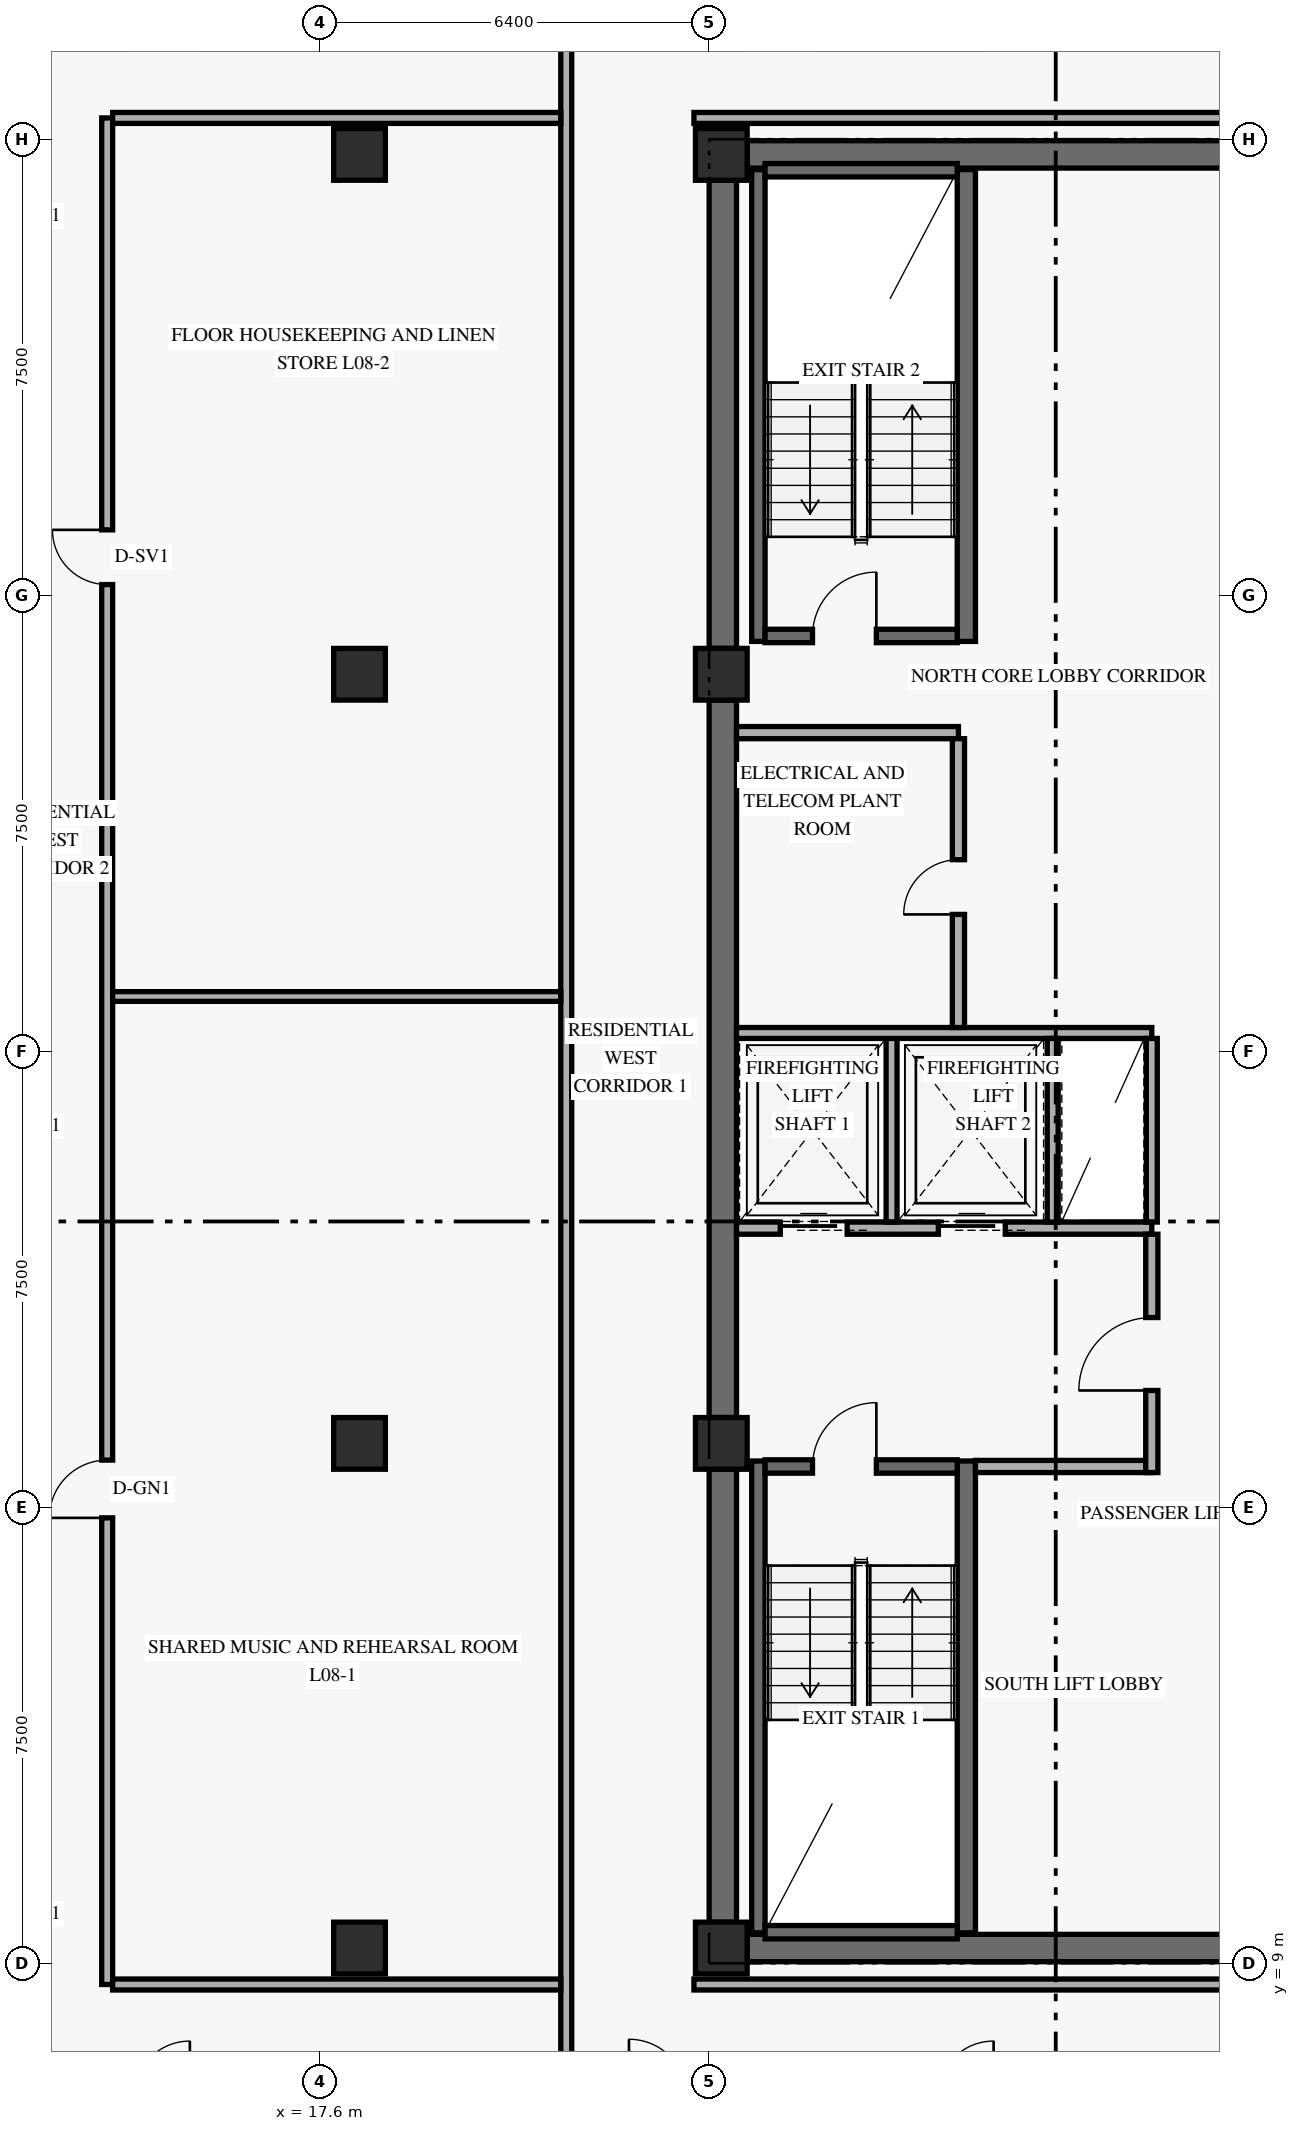
"""IFC4 building model, lengths in metres.
Left out: names, types, materials, properties, quantities, classifications, styles, units other than length and angle.
Written with IfcOpenShell. Run it as: python <this file> out.ifc"""

import sys

from ifc_helpers import new_model, si_unit, direction, frame, frame_2d, origin, origin_2d, place, context, subcontext, project, spatial, rectangle, extrude, element, fill, save


model = new_model("IFC4")
c1 = context("Model", 3, precision=1e-05, world=origin(), true_north=direction((0.0, 1.0)))
c2 = subcontext(c1, "Body", "Model", "MODEL_VIEW")
j1 = project(units=[si_unit("LENGTHUNIT", "METRE"), si_unit("PLANEANGLEUNIT", "RADIAN")], contexts=[c1])
p1 = place(None, origin())
s1 = spatial("IfcSite", under=j1, at=p1, CompositionType="ELEMENT")
p2 = place(p1, origin())
s2 = spatial("IfcBuilding", under=s1, at=p2, CompositionType="ELEMENT")
p3 = place(p2, frame((0.0, 0.0, 34.8)))
s3 = spatial("IfcBuildingStorey", under=s2, at=p3, CompositionType="ELEMENT", Elevation=34.8)
p4 = place(p3, frame((24.225, 9.675, 0.0), z_axis=(0.0, 0.0, 1.0), x_axis=(0.0, 1.0, 0.0)))
e1 = element("IfcWall", 1, at=p4, inside=s3, PredefinedType="SHEAR", context=c2, shape_type="SweptSolid", body=[
    extrude(rectangle(XDim=7.45, YDim=0.45, at=frame_2d((3.725, 0.0))), origin(), (0.0, 0.0, 1.0), 2.667),
])
p5 = place(p3, frame((24.225, 17.975, 0.0), z_axis=(0.0, 0.0, 1.0), x_axis=(0.0, 1.0, 0.0)))
e2 = element("IfcWall", 2, at=p5, inside=s3, PredefinedType="SHEAR", context=c2, shape_type="SweptSolid", body=[
    extrude(rectangle(XDim=11.8, YDim=0.45, at=frame_2d((5.9, 0.0))), origin(), (0.0, 0.0, 1.0), 2.667),
])
p6 = place(p3, frame((24.225, 30.625, 0.0), z_axis=(0.0, 0.0, 1.0), x_axis=(0.0, 1.0, 0.0)))
e3 = element("IfcWall", 3, at=p6, inside=s3, PredefinedType="SHEAR", context=c2, shape_type="SweptSolid", body=[
    extrude(rectangle(XDim=7.7, YDim=0.45, at=frame_2d((3.85, 0.0))), origin(), (0.0, 0.0, 1.0), 2.667),
])
for number, where, z_axis, x_axis in (
    (4, (24.625, 9.25, 0.0), (0.0, 0.0, 1.0), (1.0, 0.0, 0.0)),
    (5, (24.625, 38.75, 0.0), (0.0, 0.0, 1.0), (1.0, 0.0, 0.0)),
):
    element("IfcWall", number, at=place(p3, frame(where, z_axis=z_axis, x_axis=x_axis)), inside=s3, PredefinedType="SHEAR", context=c2, shape_type="SweptSolid", body=[
        extrude(rectangle(XDim=10.15, YDim=0.45, at=frame_2d((5.075, 0.0))), origin(), (0.0, 0.0, 1.0), 3.36),
    ])
p7 = place(p3, frame((24.81, 9.5, 0.0), z_axis=(0.0, 0.0, 1.0), x_axis=(0.0, 1.0, 0.0)))
e6 = element("IfcWall", 6, at=p7, inside=s3, PredefinedType="SHEAR", context=c2, shape_type="SweptSolid", body=[
    extrude(rectangle(XDim=7.76, YDim=0.22, at=frame_2d((3.88, 0.0))), origin(), (0.0, 0.0, 1.0), 3.36),
])
p8 = place(p3, frame((28.23, 9.5, 0.0), z_axis=(0.0, 0.0, 1.0), x_axis=(0.0, 1.0, 0.0)))
e7 = element("IfcWall", 7, at=p8, inside=s3, PredefinedType="SHEAR", context=c2, shape_type="SweptSolid", body=[
    extrude(rectangle(XDim=7.76, YDim=0.3, at=frame_2d((3.88, 0.0))), origin(), (0.0, 0.0, 1.0), 3.36),
])
p9 = place(p3, frame((24.92, 9.51, 0.0), z_axis=(0.0, 0.0, 1.0), x_axis=(1.0, 0.0, 0.0)))
e8 = element("IfcWall", 8, at=p9, inside=s3, PredefinedType="SHEAR", context=c2, shape_type="SweptSolid", body=[
    extrude(rectangle(XDim=3.16, YDim=0.22, at=frame_2d((1.58, 0.0))), origin(), (0.0, 0.0, 1.0), 3.36),
])
p10 = place(p3, frame((24.92, 17.17, 0.0), z_axis=(0.0, 0.0, 1.0), x_axis=(1.0, 0.0, 0.0)))
e9 = element("IfcWall", 9, at=p10, inside=s3, PredefinedType="SHEAR", context=c2, shape_type="SweptSolid", body=[
    extrude(rectangle(XDim=3.16, YDim=0.22, at=frame_2d((1.58, 0.0))), origin(), (0.0, 0.0, 1.0), 3.36),
])
p11 = place(p10, frame((0.78, 0.0, 0.0)))
e10 = element("IfcOpeningElement", 10, at=p11, cuts=e9, PredefinedType="OPENING", context=c2, shape_type="SweptSolid", body=[
    extrude(rectangle(XDim=1.05, YDim=2.15, at=frame_2d((0.525, 1.075))), frame((0.0, 0.12, 0.0), z_axis=(0.0, -1.0, 0.0), x_axis=(1.0, 0.0, 0.0)), (0.0, 0.0, 1.0), 0.24),
])
p12 = place(p3, frame((24.81, 30.74, 0.0), z_axis=(0.0, 0.0, 1.0), x_axis=(0.0, 1.0, 0.0)))
e11 = element("IfcWall", 11, at=p12, inside=s3, PredefinedType="SHEAR", context=c2, shape_type="SweptSolid", body=[
    extrude(rectangle(XDim=7.76, YDim=0.22, at=frame_2d((3.88, 0.0))), origin(), (0.0, 0.0, 1.0), 3.36),
])
p13 = place(p3, frame((28.23, 30.74, 0.0), z_axis=(0.0, 0.0, 1.0), x_axis=(0.0, 1.0, 0.0)))
e12 = element("IfcWall", 12, at=p13, inside=s3, PredefinedType="SHEAR", context=c2, shape_type="SweptSolid", body=[
    extrude(rectangle(XDim=7.76, YDim=0.3, at=frame_2d((3.88, 0.0))), origin(), (0.0, 0.0, 1.0), 3.36),
])
p14 = place(p3, frame((24.92, 30.83, 0.0), z_axis=(0.0, 0.0, 1.0), x_axis=(1.0, 0.0, 0.0)))
e13 = element("IfcWall", 13, at=p14, inside=s3, PredefinedType="SHEAR", context=c2, shape_type="SweptSolid", body=[
    extrude(rectangle(XDim=3.16, YDim=0.22, at=frame_2d((1.58, 0.0))), origin(), (0.0, 0.0, 1.0), 3.36),
])
p15 = place(p14, frame((0.78, 0.0, 0.0)))
e14 = element("IfcOpeningElement", 14, at=p15, cuts=e13, PredefinedType="OPENING", context=c2, shape_type="SweptSolid", body=[
    extrude(rectangle(XDim=1.05, YDim=2.15, at=frame_2d((0.525, 1.075))), frame((0.0, 0.12, 0.0), z_axis=(0.0, -1.0, 0.0), x_axis=(1.0, 0.0, 0.0)), (0.0, 0.0, 1.0), 0.24),
])
p16 = place(p3, frame((24.92, 38.49, 0.0), z_axis=(0.0, 0.0, 1.0), x_axis=(1.0, 0.0, 0.0)))
e15 = element("IfcWall", 15, at=p16, inside=s3, PredefinedType="SHEAR", context=c2, shape_type="SweptSolid", body=[
    extrude(rectangle(XDim=3.16, YDim=0.22, at=frame_2d((1.58, 0.0))), origin(), (0.0, 0.0, 1.0), 3.36),
])
for number, where, z_axis, x_axis in (
    (16, (18.25, 9.25, 0.0), (0.0, 0.0, 1.0), (1.0, 0.0, 0.0)),
    (17, (18.25, 17.55, 0.0), (0.0, 0.0, 1.0), (1.0, 0.0, 0.0)),
    (18, (18.25, 30.2, 0.0), (0.0, 0.0, 1.0), (1.0, 0.0, 0.0)),
    (19, (18.25, 38.75, 0.0), (0.0, 0.0, 1.0), (1.0, 0.0, 0.0)),
    (20, (24.2, 9.25, 0.0), (0.0, 0.0, 1.0), (1.0, 0.0, 0.0)),
    (21, (24.2, 17.55, 0.0), (0.0, 0.0, 1.0), (1.0, 0.0, 0.0)),
    (22, (24.2, 30.2, 0.0), (0.0, 0.0, 1.0), (1.0, 0.0, 0.0)),
    (23, (24.2, 38.75, 0.0), (0.0, 0.0, 1.0), (1.0, 0.0, 0.0)),
):
    element("IfcColumn", number, at=place(p3, frame(where, z_axis=z_axis, x_axis=x_axis)), inside=s3, PredefinedType="COLUMN", context=c2, shape_type="SweptSolid", body=[
        extrude(rectangle(XDim=0.85, YDim=0.85, at=origin_2d()), origin(), (0.0, 0.0, 1.0), 3.6),
    ])
p17 = place(p3, frame((24.45, 21.09, 0.0), z_axis=(0.0, 0.0, 1.0), x_axis=(1.0, 0.0, 0.0)))
e24 = element("IfcWall", 24, at=p17, inside=s3, PredefinedType="STANDARD", context=c2, shape_type="SweptSolid", body=[
    extrude(rectangle(XDim=6.83, YDim=0.2, at=frame_2d((3.415, 0.0))), origin(), (0.0, 0.0, 1.0), 3.36),
])
p18 = place(p17, frame((0.72, 0.0, 0.0)))
e25 = element("IfcOpeningElement", 25, at=p18, cuts=e24, PredefinedType="OPENING", context=c2, shape_type="SweptSolid", body=[
    extrude(rectangle(XDim=1.1, YDim=2.2, at=frame_2d((0.55, 1.1))), frame((0.0, 0.11, 0.0), z_axis=(0.0, -1.0, 0.0), x_axis=(1.0, 0.0, 0.0)), (0.0, 0.0, 1.0), 0.22),
])
p19 = place(p17, frame((3.32, 0.0, 0.0)))
e26 = element("IfcOpeningElement", 26, at=p19, cuts=e24, PredefinedType="OPENING", context=c2, shape_type="SweptSolid", body=[
    extrude(rectangle(XDim=1.1, YDim=2.2, at=frame_2d((0.55, 1.1))), frame((0.0, 0.11, 0.0), z_axis=(0.0, -1.0, 0.0), x_axis=(1.0, 0.0, 0.0)), (0.0, 0.0, 1.0), 0.22),
])
p20 = place(p3, frame((28.38, 17.17, 0.0), z_axis=(0.0, 0.0, 1.0), x_axis=(1.0, 0.0, 0.0)))
e27 = element("IfcWall", 27, at=p20, inside=s3, PredefinedType="STANDARD", context=c2, shape_type="SweptSolid", body=[
    extrude(rectangle(XDim=2.9, YDim=0.2, at=frame_2d((1.45, 0.0))), origin(), (0.0, 0.0, 1.0), 3.36),
])
p21 = place(p3, frame((31.28, 17.07, 0.0), z_axis=(0.0, 0.0, 1.0), x_axis=(0.0, 1.0, 0.0)))
e28 = element("IfcWall", 28, at=p21, inside=s3, PredefinedType="STANDARD", context=c2, shape_type="SweptSolid", body=[
    extrude(rectangle(XDim=3.92, YDim=0.2, at=frame_2d((1.96, 0.0))), origin(), (0.0, 0.0, 1.0), 2.649),
])
p22 = place(p21, frame((1.35, 0.0, 0.0)))
e29 = element("IfcOpeningElement", 29, at=p22, cuts=e28, PredefinedType="OPENING", context=c2, shape_type="SweptSolid", body=[
    extrude(rectangle(XDim=1.2, YDim=2.15, at=frame_2d((0.6, 1.075))), frame((0.0, 0.11, 0.0), z_axis=(0.0, -1.0, 0.0), x_axis=(1.0, 0.0, 0.0)), (0.0, 0.0, 1.0), 0.22),
])
p23 = place(p3, frame((27.0, 21.19, 0.0), z_axis=(0.0, 0.0, 1.0), x_axis=(0.0, 1.0, 0.0)))
e30 = element("IfcWall", 30, at=p23, inside=s3, PredefinedType="STANDARD", context=c2, shape_type="SweptSolid", body=[
    extrude(rectangle(XDim=3.11, YDim=0.18, at=frame_2d((1.555, 0.0))), origin(), (0.0, 0.0, 1.0), 3.36),
])
p24 = place(p3, frame((24.45, 24.3, 0.0), z_axis=(0.0, 0.0, 1.0), x_axis=(1.0, 0.0, 0.0)))
e31 = element("IfcWall", 31, at=p24, inside=s3, PredefinedType="STANDARD", context=c2, shape_type="SweptSolid", body=[
    extrude(rectangle(XDim=6.83, YDim=0.18, at=frame_2d((3.415, 0.0))), origin(), (0.0, 0.0, 1.0), 3.36),
])
for number, where, z_axis, x_axis in (
    (32, (29.65, 21.19, 0.0), (0.0, 0.0, 1.0), (0.0, 1.0, 0.0)),
    (33, (31.28, 21.19, 0.0), (0.0, 0.0, 1.0), (0.0, 1.0, 0.0)),
):
    element("IfcWall", number, at=place(p3, frame(where, z_axis=z_axis, x_axis=x_axis)), inside=s3, PredefinedType="STANDARD", context=c2, shape_type="SweptSolid", body=[
        extrude(rectangle(XDim=3.02, YDim=0.18, at=frame_2d((1.51, 0.0))), origin(), (0.0, 0.0, 1.0), 3.36),
    ])
p25 = place(p3, frame((24.45, 29.24, 0.0), z_axis=(0.0, 0.0, 1.0), x_axis=(1.0, 0.0, 0.0)))
e34 = element("IfcWall", 34, at=p25, inside=s3, PredefinedType="STANDARD", context=c2, shape_type="SweptSolid", body=[
    extrude(rectangle(XDim=3.65, YDim=0.2, at=frame_2d((1.825, 0.0))), origin(), (0.0, 0.0, 1.0), 3.36),
])
p26 = place(p3, frame((28.1, 24.39, 0.0), z_axis=(0.0, 0.0, 1.0), x_axis=(0.0, 1.0, 0.0)))
e35 = element("IfcWall", 35, at=p26, inside=s3, PredefinedType="STANDARD", context=c2, shape_type="SweptSolid", body=[
    extrude(rectangle(XDim=4.75, YDim=0.2, at=frame_2d((2.375, 0.0))), origin(), (0.0, 0.0, 1.0), 3.36),
])
p27 = place(p26, frame((1.86, 0.0, 0.0)))
e36 = element("IfcOpeningElement", 36, at=p27, cuts=e35, PredefinedType="OPENING", context=c2, shape_type="SweptSolid", body=[
    extrude(rectangle(XDim=0.9, YDim=2.1, at=frame_2d((0.45, 1.05))), frame((0.0, 0.11, 0.0), z_axis=(0.0, -1.0, 0.0), x_axis=(1.0, 0.0, 0.0)), (0.0, 0.0, 1.0), 0.22),
])
p28 = place(p3, frame((21.65, 6.8, 0.0), z_axis=(0.0, 0.0, 1.0), x_axis=(0.0, 1.0, 0.0)))
e37 = element("IfcWall", 37, at=p28, inside=s3, PredefinedType="STANDARD", context=c2, shape_type="SweptSolid", body=[
    extrude(rectangle(XDim=34.4, YDim=0.18, at=frame_2d((17.2, 0.0))), origin(), (0.0, 0.0, 1.0), 2.649),
])
for number, where, z_axis, x_axis in (
    (38, (23.75, 8.65, 0.0), (0.0, 0.0, 1.0), (1.0, 0.0, 0.0)),
    (39, (23.75, 39.35, 0.0), (0.0, 0.0, 1.0), (1.0, 0.0, 0.0)),
):
    element("IfcWall", number, at=place(p3, frame(where, z_axis=z_axis, x_axis=x_axis)), inside=s3, PredefinedType="STANDARD", context=c2, shape_type="SweptSolid", body=[
        extrude(rectangle(XDim=11.67, YDim=0.18, at=frame_2d((5.835, 0.0))), origin(), (0.0, 0.0, 1.0), 2.649),
    ])
p29 = place(p3, frame((14.1, 8.65, 0.0), z_axis=(0.0, 0.0, 1.0), x_axis=(0.0, 1.0, 0.0)))
e40 = element("IfcWall", 40, at=p29, inside=s3, PredefinedType="STANDARD", context=c2, shape_type="SweptSolid", body=[
    extrude(rectangle(XDim=30.7, YDim=0.18, at=frame_2d((15.35, 0.0))), origin(), (0.0, 0.0, 1.0), 2.649),
])
p30 = place(p29, frame((7.675, 0.0, 0.0)))
e41 = element("IfcOpeningElement", 41, at=p30, cuts=e40, PredefinedType="OPENING", context=c2, shape_type="SweptSolid", body=[
    extrude(rectangle(XDim=0.95, YDim=2.15, at=frame_2d((0.475, 1.075))), frame((0.0, 0.1, 0.0), z_axis=(0.0, -1.0, 0.0), x_axis=(1.0, 0.0, 0.0)), (0.0, 0.0, 1.0), 0.2),
])
p31 = place(p29, frame((23.025, 0.0, 0.0)))
e42 = element("IfcOpeningElement", 42, at=p31, cuts=e40, PredefinedType="OPENING", context=c2, shape_type="SweptSolid", body=[
    extrude(rectangle(XDim=0.9, YDim=2.1, at=frame_2d((0.45, 1.05))), frame((0.0, 0.1, 0.0), z_axis=(0.0, -1.0, 0.0), x_axis=(1.0, 0.0, 0.0)), (0.0, 0.0, 1.0), 0.2),
])
for number, where, z_axis, x_axis in (
    (43, (14.19, 8.65, 0.0), (0.0, 0.0, 1.0), (1.0, 0.0, 0.0)),
    (44, (14.19, 39.35, 0.0), (0.0, 0.0, 1.0), (1.0, 0.0, 0.0)),
):
    element("IfcWall", number, at=place(p3, frame(where, z_axis=z_axis, x_axis=x_axis)), inside=s3, PredefinedType="STANDARD", context=c2, shape_type="SweptSolid", body=[
        extrude(rectangle(XDim=7.37, YDim=0.18, at=frame_2d((3.685, 0.0))), origin(), (0.0, 0.0, 1.0), 2.649),
    ])
p32 = place(p3, frame((14.19, 24.9, 0.0), z_axis=(0.0, 0.0, 1.0), x_axis=(1.0, 0.0, 0.0)))
e45 = element("IfcWall", 45, at=p32, inside=s3, PredefinedType="PARTITIONING", context=c2, shape_type="SweptSolid", body=[
    extrude(rectangle(XDim=7.37, YDim=0.16, at=frame_2d((3.685, 0.0))), origin(), (0.0, 0.0, 1.0), 2.649),
])
p33 = place(p11, frame((1.05, 0.0, 0.0), z_axis=(0.0, 0.0, 1.0), x_axis=(-1.0, 0.0, 0.0)))
e46 = element("IfcDoor", 46, at=p33, inside=s3, OperationType="SINGLE_SWING_LEFT", PredefinedType="DOOR", context=c2, shape_type="SweptSolid", body=[
    extrude(rectangle(XDim=1.05, YDim=2.15, at=frame_2d((0.525, 1.075))), frame((0.0, 0.025, 0.0), z_axis=(0.0, -1.0, 0.0), x_axis=(1.0, 0.0, 0.0)), (0.0, 0.0, 1.0), 0.05),
])
fill(e10, e46)
p34 = place(p15, origin())
e47 = element("IfcDoor", 47, at=p34, inside=s3, OperationType="SINGLE_SWING_RIGHT", PredefinedType="DOOR", context=c2, shape_type="SweptSolid", body=[
    extrude(rectangle(XDim=1.05, YDim=2.15, at=frame_2d((0.525, 1.075))), frame((0.0, 0.025, 0.0), z_axis=(0.0, -1.0, 0.0), x_axis=(1.0, 0.0, 0.0)), (0.0, 0.0, 1.0), 0.05),
])
fill(e14, e47)
p35 = place(p18, origin())
e48 = element("IfcDoor", 48, at=p35, inside=s3, OperationType="SLIDING_TO_LEFT", PredefinedType="DOOR", context=c2, shape_type="SweptSolid", body=[
    extrude(rectangle(XDim=1.1, YDim=2.2, at=frame_2d((0.55, 1.1))), frame((0.0, 0.025, 0.0), z_axis=(0.0, -1.0, 0.0), x_axis=(1.0, 0.0, 0.0)), (0.0, 0.0, 1.0), 0.05),
])
fill(e25, e48)
p36 = place(p19, origin())
e49 = element("IfcDoor", 49, at=p36, inside=s3, OperationType="SLIDING_TO_LEFT", PredefinedType="DOOR", context=c2, shape_type="SweptSolid", body=[
    extrude(rectangle(XDim=1.1, YDim=2.2, at=frame_2d((0.55, 1.1))), frame((0.0, 0.025, 0.0), z_axis=(0.0, -1.0, 0.0), x_axis=(1.0, 0.0, 0.0)), (0.0, 0.0, 1.0), 0.05),
])
fill(e26, e49)
p37 = place(p22, origin())
e50 = element("IfcDoor", 50, at=p37, inside=s3, OperationType="SINGLE_SWING_LEFT", PredefinedType="DOOR", context=c2, shape_type="SweptSolid", body=[
    extrude(rectangle(XDim=1.2, YDim=2.15, at=frame_2d((0.6, 1.075))), frame((0.0, 0.025, 0.0), z_axis=(0.0, -1.0, 0.0), x_axis=(1.0, 0.0, 0.0)), (0.0, 0.0, 1.0), 0.05),
])
fill(e29, e50)
p38 = place(p27, origin())
e51 = element("IfcDoor", 51, at=p38, inside=s3, OperationType="SINGLE_SWING_LEFT", PredefinedType="DOOR", context=c2, shape_type="SweptSolid", body=[
    extrude(rectangle(XDim=0.9, YDim=2.1, at=frame_2d((0.45, 1.05))), frame((0.0, 0.025, 0.0), z_axis=(0.0, -1.0, 0.0), x_axis=(1.0, 0.0, 0.0)), (0.0, 0.0, 1.0), 0.05),
])
fill(e36, e51)
p39 = place(p30, origin())
e52 = element("IfcDoor", 52, at=p39, inside=s3, OperationType="SINGLE_SWING_LEFT", PredefinedType="DOOR", context=c2, shape_type="SweptSolid", body=[
    extrude(rectangle(XDim=0.95, YDim=2.15, at=frame_2d((0.475, 1.075))), frame((0.0, 0.025, 0.0), z_axis=(0.0, -1.0, 0.0), x_axis=(1.0, 0.0, 0.0)), (0.0, 0.0, 1.0), 0.05),
])
fill(e41, e52)
p40 = place(p31, origin())
e53 = element("IfcDoor", 53, at=p40, inside=s3, OperationType="SINGLE_SWING_RIGHT", PredefinedType="DOOR", context=c2, shape_type="SweptSolid", body=[
    extrude(rectangle(XDim=0.9, YDim=2.1, at=frame_2d((0.45, 1.05))), frame((0.0, 0.025, 0.0), z_axis=(0.0, -1.0, 0.0), x_axis=(1.0, 0.0, 0.0)), (0.0, 0.0, 1.0), 0.05),
])
fill(e42, e53)
save(model, sys.argv[1])
